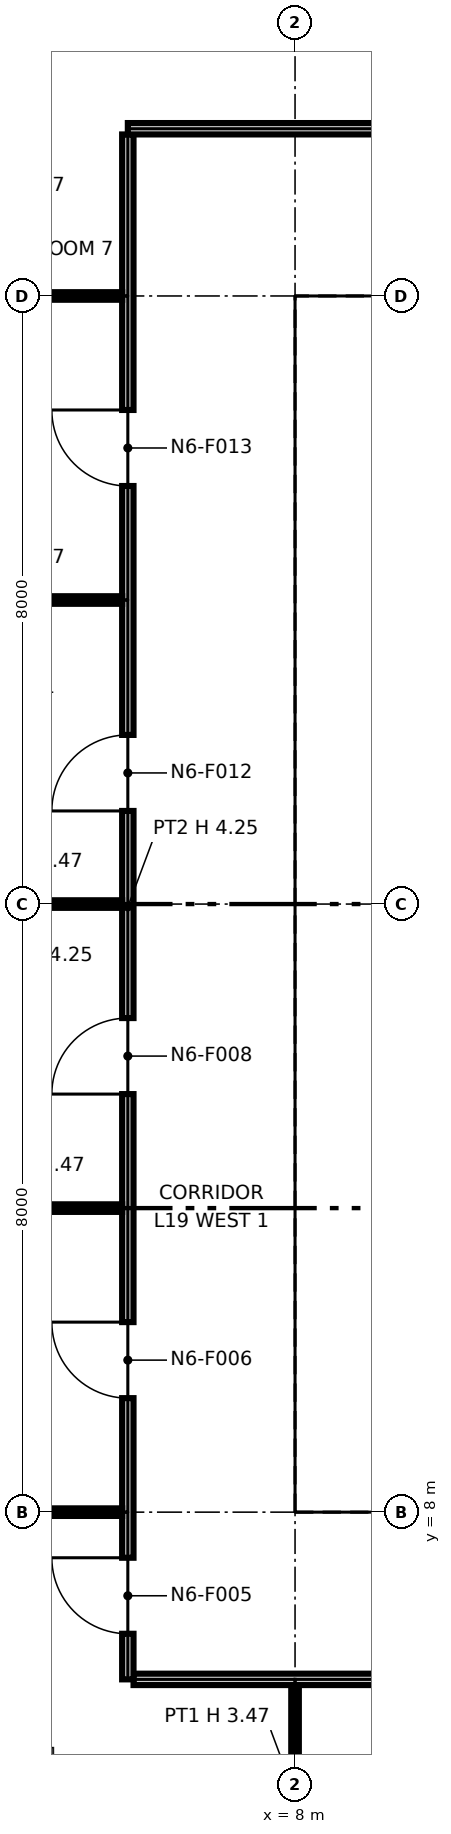
"""IFC4 building model, lengths in metres.
Left out: names, types, materials, properties, quantities, classifications, styles, units other than length and angle.
Written with IfcOpenShell. Run it as: python <this file> out.ifc"""

import sys

from ifc_helpers import new_model, si_unit, direction, frame, frame_2d, origin, origin_2d, place, context, subcontext, project, spatial, polyline, rectangle, i_section, outline, extrude, element, fill, save


model = new_model("IFC4")
c1 = context("Model", 3, precision=1e-05, world=origin(), true_north=direction((0.0, 1.0)))
c2 = subcontext(c1, "Body", "Model", "MODEL_VIEW")
j1 = project(units=[si_unit("LENGTHUNIT", "METRE"), si_unit("PLANEANGLEUNIT", "RADIAN")], contexts=[c1])
p1 = place(None, origin())
s1 = spatial("IfcSite", under=j1, at=p1, CompositionType="ELEMENT")
p2 = place(p1, origin())
s2 = spatial("IfcBuilding", under=s1, at=p2, CompositionType="ELEMENT")
p3 = place(p2, frame((0.0, 0.0, 100.8)))
s3 = spatial("IfcBuildingStorey", under=s2, at=p3, CompositionType="ELEMENT", Elevation=100.8)
for number, where, z_axis, x_axis in (
    (1, (8.0, 8.0, 0.0), (0.0, 0.0, 1.0), (1.0, 0.0, 0.0)),
    (2, (8.0, 16.0, 0.0), (0.0, 0.0, 1.0), (1.0, 0.0, 0.0)),
):
    element("IfcColumn", number, at=place(p3, frame(where, z_axis=z_axis, x_axis=x_axis)), inside=s3, PredefinedType="COLUMN", context=c2, shape_type="SweptSolid", body=[
        extrude(i_section(OverallWidth=0.406, OverallDepth=0.417, WebThickness=0.03, FlangeThickness=0.048, at=origin_2d()), origin(), (0.0, 0.0, 1.0), 4.25),
    ])
p4 = place(p3, frame((8.0, 24.0, 0.0), z_axis=(0.0, 0.0, 1.0), x_axis=(1.0, 0.0, 0.0)))
e3 = element("IfcColumn", 3, at=p4, inside=s3, PredefinedType="COLUMN", context=c2, shape_type="SweptSolid", body=[
    extrude(i_section(OverallWidth=0.411, OverallDepth=0.434, WebThickness=0.036, FlangeThickness=0.057, at=origin_2d()), origin(), (0.0, 0.0, 1.0), 4.25),
])
p5 = place(p3, frame((8.65, 8.75, 0.0), z_axis=(0.0, 0.0, 1.0), x_axis=(1.0, 0.0, 0.0)))
e4 = element("IfcWall", 4, at=p5, inside=s3, PredefinedType="PARTITIONING", context=c2, shape_type="SweptSolid", body=[
    extrude(outline(polyline([(0.0, 0.0), (14.7, 0.0), (14.7, 4.25), (7.469, 4.25), (7.469, 3.632), (7.231, 3.632), (7.23, 4.25), (0.0, 4.25), (0.0, 0.0)])), frame((0.0, 0.1, 0.0), z_axis=(0.0, -1.0, 0.0), x_axis=(1.0, 0.0, 0.0)), (0.0, 0.0, 1.0), 0.2),
])
p6 = place(p5, frame((1.3, 0.0, 0.0)))
e5 = element("IfcOpeningElement", 5, at=p6, cuts=e4, PredefinedType="OPENING", context=c2, shape_type="SweptSolid", body=[
    extrude(rectangle(XDim=1.4, YDim=2.1, at=frame_2d((0.7, 1.05))), frame((0.0, 0.11, 0.0), z_axis=(0.0, -1.0, 0.0), x_axis=(1.0, 0.0, 0.0)), (0.0, 0.0, 1.0), 0.22),
])
p7 = place(p5, frame((4.6, 0.0, 0.0)))
e6 = element("IfcOpeningElement", 6, at=p7, cuts=e4, PredefinedType="OPENING", context=c2, shape_type="SweptSolid", body=[
    extrude(rectangle(XDim=1.4, YDim=2.1, at=frame_2d((0.7, 1.05))), frame((0.0, 0.11, 0.0), z_axis=(0.0, -1.0, 0.0), x_axis=(1.0, 0.0, 0.0)), (0.0, 0.0, 1.0), 0.22),
])
p8 = place(p5, frame((10.4, 0.0, 0.0)))
e7 = element("IfcOpeningElement", 7, at=p8, cuts=e4, PredefinedType="OPENING", context=c2, shape_type="SweptSolid", body=[
    extrude(rectangle(XDim=1.2, YDim=2.1, at=frame_2d((0.6, 1.05))), frame((0.0, 0.11, 0.0), z_axis=(0.0, -1.0, 0.0), x_axis=(1.0, 0.0, 0.0)), (0.0, 0.0, 1.0), 0.22),
])
p9 = place(p3, frame((8.75, 8.85, 0.0), z_axis=(0.0, 0.0, 1.0), x_axis=(0.0, 1.0, 0.0)))
e8 = element("IfcWall", 8, at=p9, inside=s3, PredefinedType="PARTITIONING", context=c2, shape_type="SweptSolid", body=[
    extrude(outline(polyline([(0.0, 0.0), (14.3, 0.0), (14.3, 4.25), (10.231, 4.25), (10.23, 3.789), (10.07, 3.789), (10.069, 4.25), (7.27, 4.25), (7.269, 3.632), (7.031, 3.632), (7.031, 4.25), (0.0, 4.25), (0.0, 0.0)])), frame((0.0, 0.1, 0.0), z_axis=(0.0, -1.0, 0.0), x_axis=(1.0, 0.0, 0.0)), (0.0, 0.0, 1.0), 0.2),
])
p10 = place(p9, frame((8.3, 0.0, 0.0)))
e9 = element("IfcOpeningElement", 9, at=p10, cuts=e8, PredefinedType="OPENING", context=c2, shape_type="SweptSolid", body=[
    extrude(rectangle(XDim=1.8, YDim=2.1, at=frame_2d((0.9, 1.05))), frame((0.0, 0.11, 0.0), z_axis=(0.0, -1.0, 0.0), x_axis=(1.0, 0.0, 0.0)), (0.0, 0.0, 1.0), 0.22),
])
p11 = place(p3, frame((8.65, 23.25, 0.0), z_axis=(0.0, 0.0, 1.0), x_axis=(1.0, 0.0, 0.0)))
e10 = element("IfcWall", 10, at=p11, inside=s3, PredefinedType="PARTITIONING", context=c2, shape_type="SweptSolid", body=[
    extrude(outline(polyline([(0.0, 0.0), (14.7, 0.0), (14.7, 4.25), (7.469, 4.25), (7.469, 3.632), (7.231, 3.632), (7.23, 4.25), (0.0, 4.25), (0.0, 0.0)])), frame((0.0, 0.1, 0.0), z_axis=(0.0, -1.0, 0.0), x_axis=(1.0, 0.0, 0.0)), (0.0, 0.0, 1.0), 0.2),
])
p12 = place(p3, frame((8.85, 16.0, 0.0), z_axis=(0.0, 0.0, 1.0), x_axis=(1.0, 0.0, 0.0)))
e11 = element("IfcWall", 11, at=p12, inside=s3, PredefinedType="PARTITIONING", context=c2, shape_type="SweptSolid", body=[
    extrude(rectangle(XDim=6.931, YDim=0.6, at=frame_2d((3.466, 0.0))), origin(), (0.0, 0.0, 1.0), 3.632),
])
p13 = place(p3, frame((8.85, 19.9, 0.0), z_axis=(0.0, 0.0, 1.0), x_axis=(1.0, 0.0, 0.0)))
e12 = element("IfcWall", 12, at=p13, inside=s3, PredefinedType="PARTITIONING", context=c2, shape_type="SweptSolid", body=[
    extrude(outline(polyline([(0.0, 0.0), (14.3, 0.0), (14.3, 3.789), (7.27, 3.789), (7.269, 3.632), (7.031, 3.632), (7.031, 4.25), (0.0, 4.25), (0.0, 0.0)])), frame((0.0, 0.1, 0.0), z_axis=(0.0, -1.0, 0.0), x_axis=(1.0, 0.0, 0.0)), (0.0, 0.0, 1.0), 0.2),
])
p14 = place(p13, frame((6.35, 0.0, 0.0)))
e13 = element("IfcOpeningElement", 13, at=p14, cuts=e12, PredefinedType="OPENING", context=c2, shape_type="SweptSolid", body=[
    extrude(rectangle(XDim=0.9, YDim=2.1, at=frame_2d((0.45, 1.05))), frame((0.0, 0.11, 0.0), z_axis=(0.0, -1.0, 0.0), x_axis=(1.0, 0.0, 0.0)), (0.0, 0.0, 1.0), 0.22),
])
p15 = place(p13, frame((9.0, 0.0, 0.0)))
e14 = element("IfcOpeningElement", 14, at=p15, cuts=e12, PredefinedType="OPENING", context=c2, shape_type="SweptSolid", body=[
    extrude(rectangle(XDim=0.9, YDim=2.1, at=frame_2d((0.45, 1.05))), frame((0.0, 0.11, 0.0), z_axis=(0.0, -1.0, 0.0), x_axis=(1.0, 0.0, 0.0)), (0.0, 0.0, 1.0), 0.22),
])
p16 = place(p13, frame((11.35, 0.0, 0.0)))
e15 = element("IfcOpeningElement", 15, at=p16, cuts=e12, PredefinedType="OPENING", context=c2, shape_type="SweptSolid", body=[
    extrude(rectangle(XDim=1.0, YDim=2.1, at=frame_2d((0.5, 1.05))), frame((0.0, 0.11, 0.0), z_axis=(0.0, -1.0, 0.0), x_axis=(1.0, 0.0, 0.0)), (0.0, 0.0, 1.0), 0.22),
])
p17 = place(p13, frame((13.125, 0.0, 0.0)))
e16 = element("IfcOpeningElement", 16, at=p17, cuts=e12, PredefinedType="OPENING", context=c2, shape_type="SweptSolid", body=[
    extrude(rectangle(XDim=0.9, YDim=2.1, at=frame_2d((0.45, 1.05))), frame((0.0, 0.11, 0.0), z_axis=(0.0, -1.0, 0.0), x_axis=(1.0, 0.0, 0.0)), (0.0, 0.0, 1.0), 0.22),
])
p18 = place(p3, frame((8.0, 2.83, 0.0), z_axis=(0.0, 0.0, 1.0), x_axis=(0.0, 1.0, 0.0)))
e17 = element("IfcWall", 17, at=p18, inside=s3, PredefinedType="PARTITIONING", context=c2, shape_type="SweptSolid", body=[
    extrude(rectangle(XDim=2.895, YDim=0.1, at=frame_2d((1.448, 0.0))), origin(), (0.0, 0.0, 1.0), 3.47),
])
p19 = place(p3, frame((5.875, 5.8, 0.0), z_axis=(0.0, 0.0, 1.0), x_axis=(1.0, 0.0, 0.0)))
e18 = element("IfcWall", 18, at=p19, inside=s3, PredefinedType="PARTITIONING", context=c2, shape_type="SweptSolid", body=[
    extrude(rectangle(XDim=20.25, YDim=0.15, at=frame_2d((10.125, 0.0))), origin(), (0.0, 0.0, 1.0), 4.25),
])
p20 = place(p19, frame((14.625, 0.0, 0.0), z_axis=(0.0, 0.0, 1.0), x_axis=(-1.0, 0.0, 0.0)))
e19 = element("IfcOpeningElement", 19, at=p20, cuts=e18, PredefinedType="OPENING", context=c2, shape_type="SweptSolid", body=[
    extrude(rectangle(XDim=1.0, YDim=2.1, at=frame_2d((0.5, 1.05))), frame((0.0, 0.085, 0.0), z_axis=(0.0, -1.0, 0.0), x_axis=(1.0, 0.0, 0.0)), (0.0, 0.0, 1.0), 0.17),
])
p21 = place(p19, frame((4.625, 0.0, 0.0), z_axis=(0.0, 0.0, 1.0), x_axis=(-1.0, 0.0, 0.0)))
e20 = element("IfcOpeningElement", 20, at=p21, cuts=e18, PredefinedType="OPENING", context=c2, shape_type="SweptSolid", body=[
    extrude(rectangle(XDim=1.0, YDim=2.1, at=frame_2d((0.5, 1.05))), frame((0.0, 0.085, 0.0), z_axis=(0.0, -1.0, 0.0), x_axis=(1.0, 0.0, 0.0)), (0.0, 0.0, 1.0), 0.17),
])
p22 = place(p19, frame((8.625, 0.0, 0.0), z_axis=(0.0, 0.0, 1.0), x_axis=(-1.0, 0.0, 0.0)))
e21 = element("IfcOpeningElement", 21, at=p22, cuts=e18, PredefinedType="OPENING", context=c2, shape_type="SweptSolid", body=[
    extrude(rectangle(XDim=1.0, YDim=2.1, at=frame_2d((0.5, 1.05))), frame((0.0, 0.085, 0.0), z_axis=(0.0, -1.0, 0.0), x_axis=(1.0, 0.0, 0.0)), (0.0, 0.0, 1.0), 0.17),
])
p23 = place(p3, frame((5.8, 5.8, 0.0), z_axis=(0.0, 0.0, 1.0), x_axis=(0.0, 1.0, 0.0)))
e22 = element("IfcWall", 22, at=p23, inside=s3, PredefinedType="PARTITIONING", context=c2, shape_type="SweptSolid", body=[
    extrude(outline(polyline([(0.0, 0.0), (20.325, 0.0), (20.325, 4.25), (18.5, 4.25), (18.498, 3.47), (17.902, 3.47), (17.9, 4.25), (14.5, 4.25), (14.498, 3.47), (13.902, 3.47), (13.9, 4.25), (10.5, 4.25), (10.498, 3.47), (9.902, 3.47), (9.9, 4.25), (6.5, 4.25), (6.498, 3.47), (5.902, 3.47), (5.9, 4.25), (2.5, 4.25), (2.498, 3.47), (1.902, 3.47), (1.9, 4.25), (0.0, 4.25), (0.0, 0.0)])), frame((0.0, 0.075, 0.0), z_axis=(0.0, -1.0, 0.0), x_axis=(1.0, 0.0, 0.0)), (0.0, 0.0, 1.0), 0.15),
])
p24 = place(p23, frame((0.6, 0.0, 0.0)))
e23 = element("IfcOpeningElement", 23, at=p24, cuts=e22, PredefinedType="OPENING", context=c2, shape_type="SweptSolid", body=[
    extrude(rectangle(XDim=1.0, YDim=2.1, at=frame_2d((0.5, 1.05))), frame((0.0, 0.085, 0.0), z_axis=(0.0, -1.0, 0.0), x_axis=(1.0, 0.0, 0.0)), (0.0, 0.0, 1.0), 0.17),
])
p25 = place(p23, frame((3.7, 0.0, 0.0)))
e24 = element("IfcOpeningElement", 24, at=p25, cuts=e22, PredefinedType="OPENING", context=c2, shape_type="SweptSolid", body=[
    extrude(rectangle(XDim=1.0, YDim=2.1, at=frame_2d((0.5, 1.05))), frame((0.0, 0.085, 0.0), z_axis=(0.0, -1.0, 0.0), x_axis=(1.0, 0.0, 0.0)), (0.0, 0.0, 1.0), 0.17),
])
p26 = place(p23, frame((7.7, 0.0, 0.0)))
e25 = element("IfcOpeningElement", 25, at=p26, cuts=e22, PredefinedType="OPENING", context=c2, shape_type="SweptSolid", body=[
    extrude(rectangle(XDim=1.0, YDim=2.1, at=frame_2d((0.5, 1.05))), frame((0.0, 0.085, 0.0), z_axis=(0.0, -1.0, 0.0), x_axis=(1.0, 0.0, 0.0)), (0.0, 0.0, 1.0), 0.17),
])
p27 = place(p23, frame((11.425, 0.0, 0.0)))
e26 = element("IfcOpeningElement", 26, at=p27, cuts=e22, PredefinedType="OPENING", context=c2, shape_type="SweptSolid", body=[
    extrude(rectangle(XDim=1.0, YDim=2.1, at=frame_2d((0.5, 1.05))), frame((0.0, 0.085, 0.0), z_axis=(0.0, -1.0, 0.0), x_axis=(1.0, 0.0, 0.0)), (0.0, 0.0, 1.0), 0.17),
])
p28 = place(p23, frame((15.7, 0.0, 0.0)))
e27 = element("IfcOpeningElement", 27, at=p28, cuts=e22, PredefinedType="OPENING", context=c2, shape_type="SweptSolid", body=[
    extrude(rectangle(XDim=1.0, YDim=2.1, at=frame_2d((0.5, 1.05))), frame((0.0, 0.085, 0.0), z_axis=(0.0, -1.0, 0.0), x_axis=(1.0, 0.0, 0.0)), (0.0, 0.0, 1.0), 0.17),
])
p29 = place(p3, frame((2.35, 8.0, 0.0), z_axis=(0.0, 0.0, 1.0), x_axis=(1.0, 0.0, 0.0)))
e28 = element("IfcWall", 28, at=p29, inside=s3, PredefinedType="PARTITIONING", context=c2, shape_type="SweptSolid", body=[
    extrude(rectangle(XDim=3.375, YDim=0.1, at=frame_2d((1.688, 0.0))), origin(), (0.0, 0.0, 1.0), 3.47),
])
p30 = place(p3, frame((3.35, 12.0, 0.0), z_axis=(0.0, 0.0, 1.0), x_axis=(1.0, 0.0, 0.0)))
e29 = element("IfcWall", 29, at=p30, inside=s3, PredefinedType="PARTITIONING", context=c2, shape_type="SweptSolid", body=[
    extrude(rectangle(XDim=2.375, YDim=0.1, at=frame_2d((1.188, 0.0))), origin(), (0.0, 0.0, 1.0), 3.47),
])
p31 = place(p3, frame((3.3, 16.0, 0.0), z_axis=(0.0, 0.0, 1.0), x_axis=(1.0, 0.0, 0.0)))
e30 = element("IfcWall", 30, at=p31, inside=s3, PredefinedType="PARTITIONING", context=c2, shape_type="SweptSolid", body=[
    extrude(rectangle(XDim=2.425, YDim=0.1, at=frame_2d((1.212, 0.0))), origin(), (0.0, 0.0, 1.0), 3.47),
])
for number, where, z_axis, x_axis in (
    (31, (2.83, 20.0, 0.0), (0.0, 0.0, 1.0), (1.0, 0.0, 0.0)),
    (32, (2.83, 24.0, 0.0), (0.0, 0.0, 1.0), (1.0, 0.0, 0.0)),
):
    element("IfcWall", number, at=place(p3, frame(where, z_axis=z_axis, x_axis=x_axis)), inside=s3, PredefinedType="PARTITIONING", context=c2, shape_type="SweptSolid", body=[
        extrude(rectangle(XDim=2.895, YDim=0.1, at=frame_2d((1.448, 0.0))), origin(), (0.0, 0.0, 1.0), 3.47),
    ])
p32 = place(p3, frame((5.8, 26.2, 0.0), z_axis=(0.0, 0.0, 1.0), x_axis=(1.0, 0.0, 0.0)))
e33 = element("IfcWall", 33, at=p32, inside=s3, PredefinedType="PARTITIONING", context=c2, shape_type="SweptSolid", body=[
    extrude(rectangle(XDim=18.125, YDim=0.15, at=frame_2d((9.062, 0.0))), origin(), (0.0, 0.0, 1.0), 4.25),
])
p33 = place(p32, frame((13.7, 0.0, 0.0)))
e34 = element("IfcOpeningElement", 34, at=p33, cuts=e33, PredefinedType="OPENING", context=c2, shape_type="SweptSolid", body=[
    extrude(rectangle(XDim=1.0, YDim=2.1, at=frame_2d((0.5, 1.05))), frame((0.0, 0.085, 0.0), z_axis=(0.0, -1.0, 0.0), x_axis=(1.0, 0.0, 0.0)), (0.0, 0.0, 1.0), 0.17),
])
p34 = place(p32, frame((5.3, 0.0, 0.0)))
e35 = element("IfcOpeningElement", 35, at=p34, cuts=e33, PredefinedType="OPENING", context=c2, shape_type="SweptSolid", body=[
    extrude(rectangle(XDim=1.8, YDim=2.1, at=frame_2d((0.9, 1.05))), frame((0.0, 0.085, 0.0), z_axis=(0.0, -1.0, 0.0), x_axis=(1.0, 0.0, 0.0)), (0.0, 0.0, 1.0), 0.17),
])
p35 = place(p10, origin())
e36 = element("IfcDoor", 36, at=p35, inside=s3, OperationType="DOUBLE_DOOR_SINGLE_SWING", PredefinedType="NOTDEFINED", context=c2, shape_type="SweptSolid", body=[
    extrude(rectangle(XDim=1.8, YDim=2.1, at=frame_2d((0.9, 1.05))), frame((0.0, 0.025, 0.0), z_axis=(0.0, -1.0, 0.0), x_axis=(1.0, 0.0, 0.0)), (0.0, 0.0, 1.0), 0.05),
])
fill(e9, e36)
p36 = place(p24, origin())
e37 = element("IfcDoor", 37, at=p36, inside=s3, OperationType="SINGLE_SWING_RIGHT", PredefinedType="DOOR", context=c2, shape_type="SweptSolid", body=[
    extrude(rectangle(XDim=1.0, YDim=2.1, at=frame_2d((0.5, 1.05))), frame((0.0, 0.025, 0.0), z_axis=(0.0, -1.0, 0.0), x_axis=(1.0, 0.0, 0.0)), (0.0, 0.0, 1.0), 0.05),
])
fill(e23, e37)
p37 = place(p25, origin())
e38 = element("IfcDoor", 38, at=p37, inside=s3, OperationType="SINGLE_SWING_RIGHT", PredefinedType="DOOR", context=c2, shape_type="SweptSolid", body=[
    extrude(rectangle(XDim=1.0, YDim=2.1, at=frame_2d((0.5, 1.05))), frame((0.0, 0.025, 0.0), z_axis=(0.0, -1.0, 0.0), x_axis=(1.0, 0.0, 0.0)), (0.0, 0.0, 1.0), 0.05),
])
fill(e24, e38)
p38 = place(p26, origin())
e39 = element("IfcDoor", 39, at=p38, inside=s3, OperationType="SINGLE_SWING_LEFT", PredefinedType="DOOR", context=c2, shape_type="SweptSolid", body=[
    extrude(rectangle(XDim=1.0, YDim=2.1, at=frame_2d((0.5, 1.05))), frame((0.0, 0.025, 0.0), z_axis=(0.0, -1.0, 0.0), x_axis=(1.0, 0.0, 0.0)), (0.0, 0.0, 1.0), 0.05),
])
fill(e25, e39)
p39 = place(p27, origin())
e40 = element("IfcDoor", 40, at=p39, inside=s3, OperationType="SINGLE_SWING_LEFT", PredefinedType="DOOR", context=c2, shape_type="SweptSolid", body=[
    extrude(rectangle(XDim=1.0, YDim=2.1, at=frame_2d((0.5, 1.05))), frame((0.0, 0.025, 0.0), z_axis=(0.0, -1.0, 0.0), x_axis=(1.0, 0.0, 0.0)), (0.0, 0.0, 1.0), 0.05),
])
fill(e26, e40)
p40 = place(p28, origin())
e41 = element("IfcDoor", 41, at=p40, inside=s3, OperationType="SINGLE_SWING_RIGHT", PredefinedType="DOOR", context=c2, shape_type="SweptSolid", body=[
    extrude(rectangle(XDim=1.0, YDim=2.1, at=frame_2d((0.5, 1.05))), frame((0.0, 0.025, 0.0), z_axis=(0.0, -1.0, 0.0), x_axis=(1.0, 0.0, 0.0)), (0.0, 0.0, 1.0), 0.05),
])
fill(e27, e41)
save(model, sys.argv[1])
